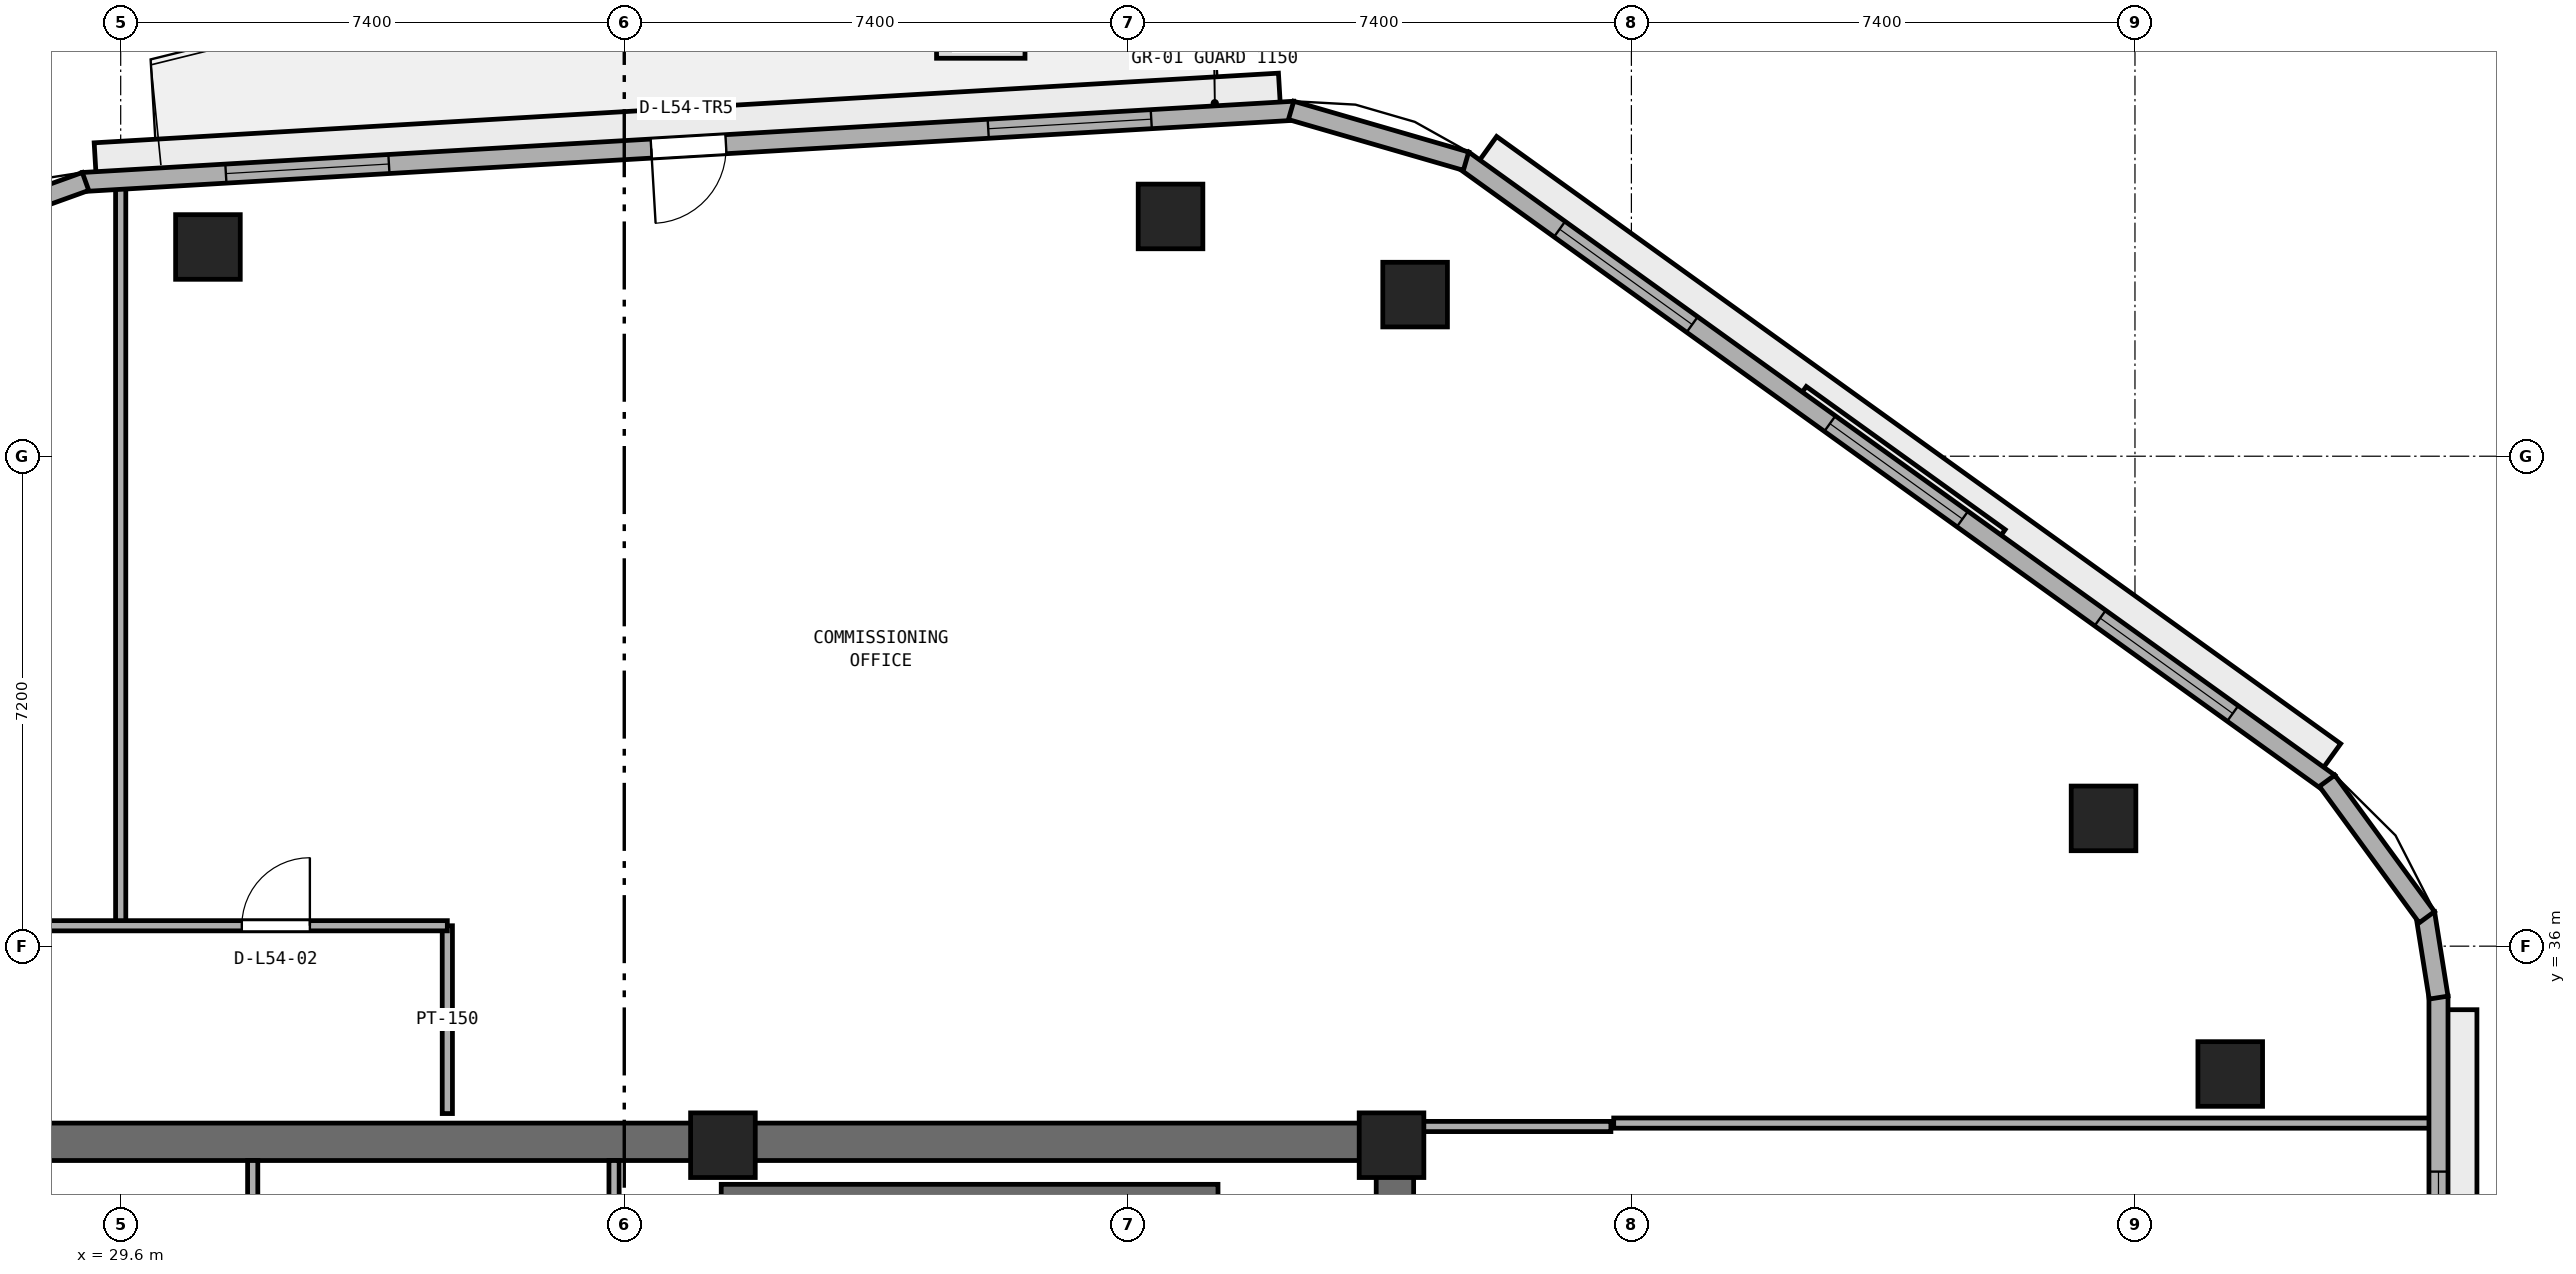
"""IFC4 building model, lengths in metres.
Left out: names, types, materials, properties, quantities, classifications, styles, units other than length and angle.
Written with IfcOpenShell. Run it as: python <this file> out.ifc"""

import sys

from ifc_helpers import new_model, si_unit, direction, frame, frame_2d, origin, origin_2d, place, context, subcontext, project, spatial, rectangle, extrude, element, fill, save


model = new_model("IFC4")
c1 = context("Model", 3, precision=1e-05, world=origin(), true_north=direction((0.0, 1.0)))
c2 = subcontext(c1, "Body", "Model", "MODEL_VIEW")
j1 = project(units=[si_unit("LENGTHUNIT", "METRE"), si_unit("PLANEANGLEUNIT", "RADIAN")], contexts=[c1])
p1 = place(None, origin())
s1 = spatial("IfcSite", under=j1, at=p1, CompositionType="ELEMENT")
p2 = place(p1, origin())
s2 = spatial("IfcBuilding", under=s1, at=p2, CompositionType="ELEMENT")
p3 = place(p2, frame((0.0, 0.0, 212.4)))
s3 = spatial("IfcBuildingStorey", under=s2, at=p3, CompositionType="ELEMENT", Elevation=212.4)
p4 = place(p3, frame((25.4, 33.125, 0.0), z_axis=(0.0, 0.0, 1.0), x_axis=(1.0, 0.0, 0.0)))
e1 = element("IfcWall", 1, at=p4, inside=s3, PredefinedType="SHEAR", context=c2, shape_type="SweptSolid", body=[
    extrude(rectangle(XDim=23.2, YDim=0.55, at=frame_2d((11.6, 0.0))), origin(), (0.0, 0.0, 1.0), 3.54),
])
p5 = place(p3, frame((48.325, 17.55, 0.0), z_axis=(0.0, 0.0, 1.0), x_axis=(0.0, 1.0, 0.0)))
e2 = element("IfcWall", 2, at=p5, inside=s3, PredefinedType="SHEAR", context=c2, shape_type="SweptSolid", body=[
    extrude(rectangle(XDim=15.3, YDim=0.55, at=frame_2d((7.65, 0.0))), origin(), (0.0, 0.0, 1.0), 3.54),
])
p6 = place(p5, frame((5.75, 0.0, 0.0)))
e3 = element("IfcOpeningElement", 3, at=p6, cuts=e2, PredefinedType="OPENING", context=c2, shape_type="SweptSolid", body=[
    extrude(rectangle(XDim=1.5, YDim=2.15, at=frame_2d((0.75, 1.075))), frame((0.0, 0.285, 0.0), z_axis=(0.0, -1.0, 0.0), x_axis=(1.0, 0.0, 0.0)), (0.0, 0.0, 1.0), 0.57),
])
for number, where, z_axis, x_axis in (
    (4, (48.275, 33.075, 0.0), (0.0, 0.0, 1.0), (1.0, 0.0, 0.0)),
    (5, (38.45, 33.075, 0.0), (0.0, 0.0, 1.0), (1.0, 0.0, 0.0)),
):
    element("IfcColumn", number, at=place(p3, frame(where, z_axis=z_axis, x_axis=x_axis)), inside=s3, PredefinedType="PILASTER", context=c2, shape_type="SweptSolid", body=[
        extrude(rectangle(XDim=0.95, YDim=0.95, at=origin_2d()), origin(), (0.0, 0.0, 1.0), 3.8),
    ])
for number, where, z_axis, x_axis in (
    (6, (60.6, 34.122, 0.0), (0.0, 0.0, 1.0), (1.0, 0.0, 0.0)),
    (7, (58.738, 37.878, 0.0), (0.0, 0.0, 1.0), (1.0, 0.0, 0.0)),
    (8, (48.622, 45.575, 0.0), (0.0, 0.0, 1.0), (1.0, 0.0, 0.0)),
    (9, (45.028, 46.724, 0.0), (0.0, 0.0, 1.0), (1.0, 0.0, 0.0)),
    (10, (30.882, 46.275, 0.0), (0.0, 0.0, 1.0), (1.0, 0.0, 0.0)),
):
    element("IfcColumn", number, at=place(p3, frame(where, z_axis=z_axis, x_axis=x_axis)), inside=s3, PredefinedType="COLUMN", context=c2, shape_type="SweptSolid", body=[
        extrude(rectangle(XDim=0.95, YDim=0.95, at=origin_2d()), origin(), (0.0, 0.0, 1.0), 3.8),
    ])
p7 = place(p3, frame((38.425, 32.375, 0.0), z_axis=(0.0, 0.0, 1.0), x_axis=(1.0, 0.0, 0.0)))
e11 = element("IfcWall", 11, at=p7, inside=s3, PredefinedType="SHEAR", context=c2, shape_type="SweptSolid", body=[
    extrude(rectangle(XDim=7.3, YDim=0.25, at=frame_2d((3.65, 0.0))), origin(), (0.0, 0.0, 1.0), 3.54),
])
for number, where, z_axis, x_axis in (
    (12, (31.54, 30.65, 0.0), (0.0, 0.0, 1.0), (0.0, 1.0, 0.0)),
    (13, (36.85, 30.65, 0.0), (0.0, 0.0, 1.0), (0.0, 1.0, 0.0)),
):
    element("IfcWall", number, at=place(p3, frame(where, z_axis=z_axis, x_axis=x_axis)), inside=s3, PredefinedType="PARTITIONING", context=c2, shape_type="SweptSolid", body=[
        extrude(rectangle(XDim=2.2, YDim=0.15, at=frame_2d((1.1, 0.0))), origin(), (0.0, 0.0, 1.0), 3.54),
    ])
p8 = place(p3, frame((34.4, 33.54, 0.0), z_axis=(0.0, 0.0, 1.0), x_axis=(0.0, 1.0, 0.0)))
e14 = element("IfcWall", 14, at=p8, inside=s3, PredefinedType="PARTITIONING", context=c2, shape_type="SweptSolid", body=[
    extrude(rectangle(XDim=2.76, YDim=0.15, at=frame_2d((1.38, 0.0))), origin(), (0.0, 0.0, 1.0), 3.54),
])
p9 = place(p3, frame((29.6, 36.3, 0.0), z_axis=(0.0, 0.0, 1.0), x_axis=(0.0, 1.0, 0.0)))
e15 = element("IfcWall", 15, at=p9, inside=s3, PredefinedType="PARTITIONING", context=c2, shape_type="SweptSolid", body=[
    extrude(rectangle(XDim=10.897, YDim=0.15, at=frame_2d((5.449, 0.0))), origin(), (0.0, 0.0, 1.0), 3.54),
])
p10 = place(p3, frame((48.74, 33.35, 0.0), z_axis=(0.0, 0.0, 1.0), x_axis=(1.0, 0.0, 0.0)))
e16 = element("IfcWall", 16, at=p10, inside=s3, PredefinedType="PARTITIONING", context=c2, shape_type="SweptSolid", body=[
    extrude(rectangle(XDim=2.759, YDim=0.15, at=frame_2d((1.379, 0.0))), origin(), (0.0, 0.0, 1.0), 2.923),
])
p11 = place(p3, frame((51.54, 33.4, 0.0), z_axis=(0.0, 0.0, 1.0), x_axis=(1.0, 0.0, 0.0)))
e17 = element("IfcWall", 17, at=p11, inside=s3, PredefinedType="PARTITIONING", context=c2, shape_type="SweptSolid", body=[
    extrude(rectangle(XDim=12.055, YDim=0.15, at=frame_2d((6.027, 0.0))), origin(), (0.0, 0.0, 1.0), 2.79),
])
p12 = place(p3, frame((22.5, 36.3, 0.0), z_axis=(0.0, 0.0, 1.0), x_axis=(1.0, 0.0, 0.0)))
e18 = element("IfcWall", 18, at=p12, inside=s3, PredefinedType="PARTITIONING", context=c2, shape_type="SweptSolid", body=[
    extrude(rectangle(XDim=11.9, YDim=0.15, at=frame_2d((5.95, 0.0))), origin(), (0.0, 0.0, 1.0), 3.54),
])
p13 = place(p12, frame((3.17, 0.0, 0.0)))
e19 = element("IfcOpeningElement", 19, at=p13, cuts=e18, PredefinedType="OPENING", context=c2, shape_type="SweptSolid", body=[
    extrude(rectangle(XDim=1.0, YDim=2.12, at=frame_2d((0.5, 1.06))), frame((0.0, 0.085, 0.0), z_axis=(0.0, -1.0, 0.0), x_axis=(1.0, 0.0, 0.0)), (0.0, 0.0, 1.0), 0.17),
])
p14 = place(p12, frame((8.88, 0.0, 0.0)))
e20 = element("IfcOpeningElement", 20, at=p14, cuts=e18, PredefinedType="OPENING", context=c2, shape_type="SweptSolid", body=[
    extrude(rectangle(XDim=1.0, YDim=2.12, at=frame_2d((0.5, 1.06))), frame((0.0, 0.085, 0.0), z_axis=(0.0, -1.0, 0.0), x_axis=(1.0, 0.0, 0.0)), (0.0, 0.0, 1.0), 0.17),
])
p15 = place(p3, frame((63.66, 16.39, 0.0), z_axis=(0.0, 0.0, 1.0), x_axis=(0.0, 1.0, 0.0)))
e21 = element("IfcWall", 21, at=p15, inside=s3, PredefinedType="STANDARD", context=c2, shape_type="SweptSolid", body=[
    extrude(rectangle(XDim=18.876, YDim=0.28, at=frame_2d((9.438, 0.0))), origin(), (0.0, 0.0, 1.0), 2.79),
])
p16 = place(p15, frame((8.038, 0.0, 0.85)))
e22 = element("IfcOpeningElement", 22, at=p16, cuts=e21, PredefinedType="OPENING", context=c2, shape_type="SweptSolid", body=[
    extrude(rectangle(XDim=1.8, YDim=1.2, at=frame_2d((0.9, 0.6))), frame((0.0, 0.15, 0.0), z_axis=(0.0, -1.0, 0.0), x_axis=(1.0, 0.0, 0.0)), (0.0, 0.0, 1.0), 0.3),
])
p17 = place(p15, frame((14.497, 0.0, 0.85)))
e23 = element("IfcOpeningElement", 23, at=p17, cuts=e21, PredefinedType="OPENING", context=c2, shape_type="SweptSolid", body=[
    extrude(rectangle(XDim=1.8, YDim=1.2, at=frame_2d((0.9, 0.6))), frame((0.0, 0.15, 0.0), z_axis=(0.0, -1.0, 0.0), x_axis=(1.0, 0.0, 0.0)), (0.0, 0.0, 1.0), 0.3),
])
p18 = place(p3, frame((62.054, 38.399, 0.0), z_axis=(0.0, 0.0, 1.0), x_axis=(-0.81172124793, 0.584045045915, 0.0)))
e24 = element("IfcWall", 24, at=p18, inside=s3, PredefinedType="STANDARD", context=c2, shape_type="SweptSolid", body=[
    extrude(rectangle(XDim=15.679, YDim=0.28, at=frame_2d((7.84, 0.0))), origin(), (0.0, 0.0, 1.0), 3.54),
])
p19 = place(p18, frame((1.747, 0.0, 0.9)))
e25 = element("IfcOpeningElement", 25, at=p19, cuts=e24, PredefinedType="OPENING", context=c2, shape_type="SweptSolid", body=[
    extrude(rectangle(XDim=2.4, YDim=1.75, at=frame_2d((1.2, 0.875))), frame((0.0, 0.15, 0.0), z_axis=(0.0, -1.0, 0.0), x_axis=(1.0, 0.0, 0.0)), (0.0, 0.0, 1.0), 0.3),
])
p20 = place(p18, frame((6.64, 0.0, 0.9)))
e26 = element("IfcOpeningElement", 26, at=p20, cuts=e24, PredefinedType="OPENING", context=c2, shape_type="SweptSolid", body=[
    extrude(rectangle(XDim=2.4, YDim=1.75, at=frame_2d((1.2, 0.875))), frame((0.0, 0.15, 0.0), z_axis=(0.0, -1.0, 0.0), x_axis=(1.0, 0.0, 0.0)), (0.0, 0.0, 1.0), 0.3),
])
p21 = place(p18, frame((11.533, 0.0, 0.9)))
e27 = element("IfcOpeningElement", 27, at=p21, cuts=e24, PredefinedType="OPENING", context=c2, shape_type="SweptSolid", body=[
    extrude(rectangle(XDim=2.4, YDim=1.75, at=frame_2d((1.2, 0.875))), frame((0.0, 0.15, 0.0), z_axis=(0.0, -1.0, 0.0), x_axis=(1.0, 0.0, 0.0)), (0.0, 0.0, 1.0), 0.3),
])
p22 = place(p3, frame((46.846, 48.277, 0.0), z_axis=(0.0, 0.0, 1.0), x_axis=(-0.998273806631, -0.05873165241, 0.0)))
e28 = element("IfcWall", 28, at=p22, inside=s3, PredefinedType="STANDARD", context=c2, shape_type="SweptSolid", body=[
    extrude(rectangle(XDim=17.833, YDim=0.28, at=frame_2d((8.917, 0.0))), origin(), (0.0, 0.0, 1.0), 3.54),
])
p23 = place(p22, frame((8.366, 0.0, 0.0)))
e29 = element("IfcOpeningElement", 29, at=p23, cuts=e28, PredefinedType="OPENING", context=c2, shape_type="SweptSolid", body=[
    extrude(rectangle(XDim=1.1, YDim=2.2, at=frame_2d((0.55, 1.1))), frame((0.0, 0.15, 0.0), z_axis=(0.0, -1.0, 0.0), x_axis=(1.0, 0.0, 0.0)), (0.0, 0.0, 1.0), 0.3),
])
p24 = place(p22, frame((2.105, 0.0, 0.9)))
e30 = element("IfcOpeningElement", 30, at=p24, cuts=e28, PredefinedType="OPENING", context=c2, shape_type="SweptSolid", body=[
    extrude(rectangle(XDim=2.4, YDim=1.75, at=frame_2d((1.2, 0.875))), frame((0.0, 0.15, 0.0), z_axis=(0.0, -1.0, 0.0), x_axis=(1.0, 0.0, 0.0)), (0.0, 0.0, 1.0), 0.3),
])
p25 = place(p22, frame((13.328, 0.0, 0.9)))
e31 = element("IfcOpeningElement", 31, at=p25, cuts=e28, PredefinedType="OPENING", context=c2, shape_type="SweptSolid", body=[
    extrude(rectangle(XDim=2.4, YDim=1.75, at=frame_2d((1.2, 0.875))), frame((0.0, 0.15, 0.0), z_axis=(0.0, -1.0, 0.0), x_axis=(1.0, 0.0, 0.0)), (0.0, 0.0, 1.0), 0.3),
])
p26 = place(p3, frame((63.662, 35.244, 0.0), z_axis=(0.0, 0.0, 1.0), x_axis=(-0.157059104921, 0.987589204863, 0.0)))
e32 = element("IfcWall", 32, at=p26, inside=s3, PredefinedType="STANDARD", context=c2, shape_type="SweptSolid", body=[
    extrude(rectangle(XDim=1.258, YDim=0.28, at=frame_2d((0.629, 0.0))), origin(), (0.0, 0.0, 1.0), 3.54),
])
p27 = place(p3, frame((63.489, 36.426, 0.0), z_axis=(0.0, 0.0, 1.0), x_axis=(-0.590267940876, 0.80720738226, 0.0)))
e33 = element("IfcWall", 33, at=p27, inside=s3, PredefinedType="STANDARD", context=c2, shape_type="SweptSolid", body=[
    extrude(rectangle(XDim=2.484, YDim=0.28, at=frame_2d((1.242, 0.0))), origin(), (0.0, 0.0, 1.0), 3.54),
])
p28 = place(p3, frame((49.37, 47.536, 0.0), z_axis=(0.0, 0.0, 1.0), x_axis=(-0.960380089791, 0.278693529048, 0.0)))
e34 = element("IfcWall", 34, at=p28, inside=s3, PredefinedType="STANDARD", context=c2, shape_type="SweptSolid", body=[
    extrude(rectangle(XDim=2.677, YDim=0.28, at=frame_2d((1.338, 0.0))), origin(), (0.0, 0.0, 1.0), 3.54),
])
p29 = place(p3, frame((29.083, 47.238, 0.0), z_axis=(0.0, 0.0, 1.0), x_axis=(-0.940723909279, -0.33917329864, 0.0)))
e35 = element("IfcWall", 35, at=p29, inside=s3, PredefinedType="STANDARD", context=c2, shape_type="SweptSolid", body=[
    extrude(rectangle(XDim=2.267, YDim=0.28, at=frame_2d((1.133, 0.0))), origin(), (0.0, 0.0, 1.0), 3.54),
])
p30 = place(p14, origin())
e36 = element("IfcDoor", 36, at=p30, inside=s3, OperationType="SINGLE_SWING_RIGHT", PredefinedType="DOOR", context=c2, shape_type="SweptSolid", body=[
    extrude(rectangle(XDim=1.0, YDim=2.12, at=frame_2d((0.5, 1.06))), frame((0.0, 0.025, 0.0), z_axis=(0.0, -1.0, 0.0), x_axis=(1.0, 0.0, 0.0)), (0.0, 0.0, 1.0), 0.05),
])
fill(e20, e36)
p31 = place(p17, origin())
e37 = element("IfcWindow", 37, at=p31, inside=s3, PartitioningType="SINGLE_PANEL", PredefinedType="WINDOW", context=c2, shape_type="SweptSolid", body=[
    extrude(rectangle(XDim=1.8, YDim=1.2, at=frame_2d((0.9, 0.6))), frame((0.0, 0.03, 0.0), z_axis=(0.0, -1.0, 0.0), x_axis=(1.0, 0.0, 0.0)), (0.0, 0.0, 1.0), 0.06),
])
fill(e23, e37)
p32 = place(p19, origin())
e38 = element("IfcWindow", 38, at=p32, inside=s3, PartitioningType="SINGLE_PANEL", PredefinedType="WINDOW", context=c2, shape_type="SweptSolid", body=[
    extrude(rectangle(XDim=2.4, YDim=1.75, at=frame_2d((1.2, 0.875))), frame((0.0, 0.03, 0.0), z_axis=(0.0, -1.0, 0.0), x_axis=(1.0, 0.0, 0.0)), (0.0, 0.0, 1.0), 0.06),
])
fill(e25, e38)
p33 = place(p20, origin())
e39 = element("IfcWindow", 39, at=p33, inside=s3, PartitioningType="SINGLE_PANEL", PredefinedType="WINDOW", context=c2, shape_type="SweptSolid", body=[
    extrude(rectangle(XDim=2.4, YDim=1.75, at=frame_2d((1.2, 0.875))), frame((0.0, 0.03, 0.0), z_axis=(0.0, -1.0, 0.0), x_axis=(1.0, 0.0, 0.0)), (0.0, 0.0, 1.0), 0.06),
])
fill(e26, e39)
p34 = place(p21, origin())
e40 = element("IfcWindow", 40, at=p34, inside=s3, PartitioningType="SINGLE_PANEL", PredefinedType="WINDOW", context=c2, shape_type="SweptSolid", body=[
    extrude(rectangle(XDim=2.4, YDim=1.75, at=frame_2d((1.2, 0.875))), frame((0.0, 0.03, 0.0), z_axis=(0.0, -1.0, 0.0), x_axis=(1.0, 0.0, 0.0)), (0.0, 0.0, 1.0), 0.06),
])
fill(e27, e40)
p35 = place(p23, origin())
e41 = element("IfcDoor", 41, at=p35, inside=s3, OperationType="SINGLE_SWING_RIGHT", PredefinedType="DOOR", context=c2, shape_type="SweptSolid", body=[
    extrude(rectangle(XDim=1.1, YDim=2.2, at=frame_2d((0.55, 1.1))), frame((0.0, 0.025, 0.0), z_axis=(0.0, -1.0, 0.0), x_axis=(1.0, 0.0, 0.0)), (0.0, 0.0, 1.0), 0.05),
])
fill(e29, e41)
p36 = place(p24, origin())
e42 = element("IfcWindow", 42, at=p36, inside=s3, PartitioningType="SINGLE_PANEL", PredefinedType="WINDOW", context=c2, shape_type="SweptSolid", body=[
    extrude(rectangle(XDim=2.4, YDim=1.75, at=frame_2d((1.2, 0.875))), frame((0.0, 0.03, 0.0), z_axis=(0.0, -1.0, 0.0), x_axis=(1.0, 0.0, 0.0)), (0.0, 0.0, 1.0), 0.06),
])
fill(e30, e42)
p37 = place(p25, origin())
e43 = element("IfcWindow", 43, at=p37, inside=s3, PartitioningType="SINGLE_PANEL", PredefinedType="WINDOW", context=c2, shape_type="SweptSolid", body=[
    extrude(rectangle(XDim=2.4, YDim=1.75, at=frame_2d((1.2, 0.875))), frame((0.0, 0.03, 0.0), z_axis=(0.0, -1.0, 0.0), x_axis=(1.0, 0.0, 0.0)), (0.0, 0.0, 1.0), 0.06),
])
fill(e31, e43)
save(model, sys.argv[1])
